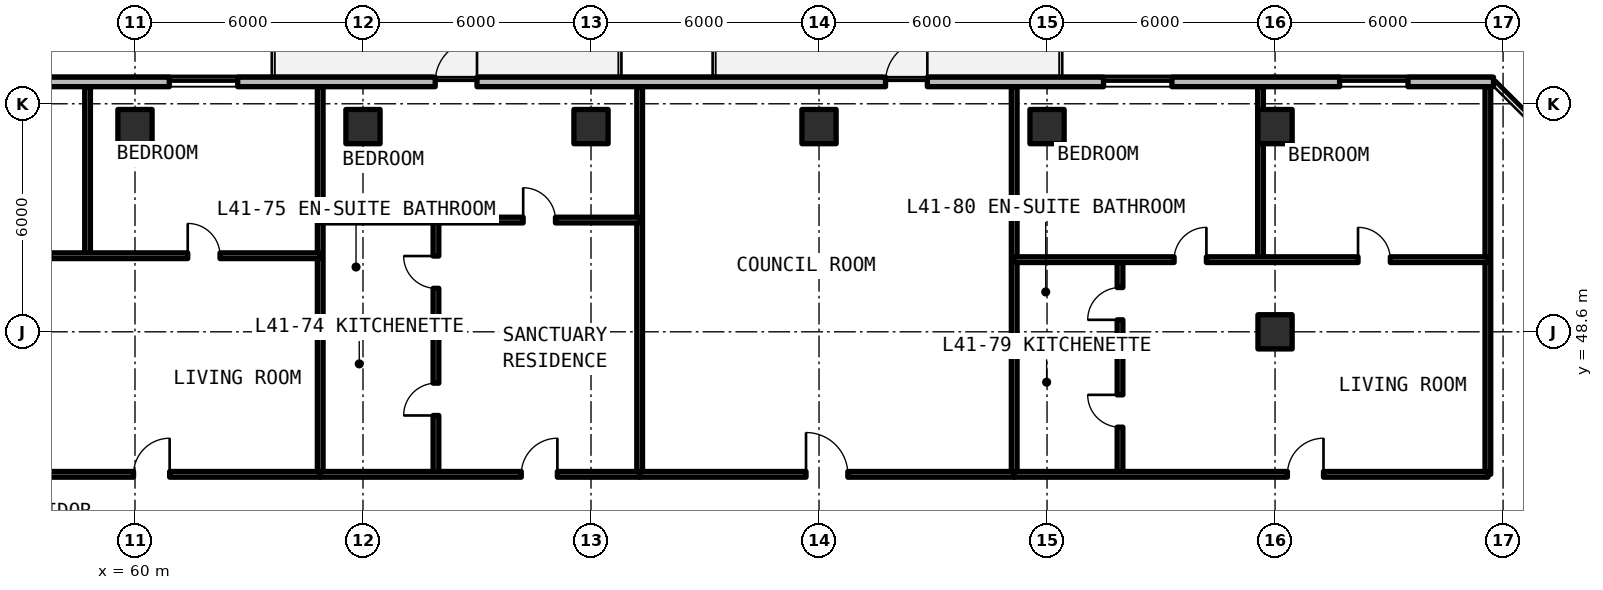
"""IFC4 building model, lengths in metres.
Left out: names, types, materials, properties, quantities, classifications, styles, units other than length and angle.
Written with IfcOpenShell. Run it as: python <this file> out.ifc"""

import sys

from ifc_helpers import new_model, si_unit, direction, frame, frame_2d, origin, origin_2d, place, context, subcontext, project, spatial, rectangle, extrude, element, fill, save


model = new_model("IFC4")
c1 = context("Model", 3, precision=1e-05, world=origin(), true_north=direction((0.0, 1.0)))
c2 = subcontext(c1, "Body", "Model", "MODEL_VIEW")
j1 = project(units=[si_unit("LENGTHUNIT", "METRE"), si_unit("PLANEANGLEUNIT", "RADIAN")], contexts=[c1])
p1 = place(None, origin())
s1 = spatial("IfcSite", under=j1, at=p1, CompositionType="ELEMENT")
p2 = place(p1, origin())
s2 = spatial("IfcBuilding", under=s1, at=p2, CompositionType="ELEMENT")
p3 = place(p2, frame((0.0, 0.0, 148.5)))
s3 = spatial("IfcBuildingStorey", under=s2, at=p3, CompositionType="ELEMENT", Elevation=148.5)
for number, where, z_axis, x_axis in (
    (1, (90.0, 48.6, 0.0), (0.0, 0.0, 1.0), (1.0, 0.0, 0.0)),
    (2, (60.0, 54.0, 0.0), (0.0, 0.0, 1.0), (1.0, 0.0, 0.0)),
    (3, (66.0, 54.0, 0.0), (0.0, 0.0, 1.0), (1.0, 0.0, 0.0)),
    (4, (72.0, 54.0, 0.0), (0.0, 0.0, 1.0), (1.0, 0.0, 0.0)),
    (5, (78.0, 54.0, 0.0), (0.0, 0.0, 1.0), (1.0, 0.0, 0.0)),
    (6, (84.0, 54.0, 0.0), (0.0, 0.0, 1.0), (1.0, 0.0, 0.0)),
    (7, (90.0, 54.0, 0.0), (0.0, 0.0, 1.0), (1.0, 0.0, 0.0)),
):
    element("IfcColumn", number, at=place(p3, frame(where, z_axis=z_axis, x_axis=x_axis)), inside=s3, PredefinedType="COLUMN", context=c2, shape_type="SweptSolid", body=[
        extrude(rectangle(XDim=0.9, YDim=0.9, at=origin_2d()), origin(), (0.0, 0.0, 1.0), 3.3),
    ])
p4 = place(p3, frame((95.748, 55.175, 0.0), z_axis=(0.0, 0.0, 1.0), x_axis=(-1.0, 0.0, 0.0)))
e8 = element("IfcWall", 8, at=p4, inside=s3, PredefinedType="SOLIDWALL", context=c2, shape_type="SweptSolid", body=[
    extrude(rectangle(XDim=43.623, YDim=0.25, at=frame_2d((21.812, 0.0))), origin(), (0.0, 0.0, 1.0), 3.08),
])
p5 = place(p4, frame((26.748, 0.0, 0.0)))
e9 = element("IfcOpeningElement", 9, at=p5, cuts=e8, PredefinedType="OPENING", context=c2, shape_type="SweptSolid", body=[
    extrude(rectangle(XDim=1.1, YDim=2.15, at=frame_2d((0.55, 1.075))), frame((0.0, 0.135, 0.0), z_axis=(0.0, -1.0, 0.0), x_axis=(1.0, 0.0, 0.0)), (0.0, 0.0, 1.0), 0.27),
])
p6 = place(p4, frame((14.898, 0.0, 0.0)))
e10 = element("IfcOpeningElement", 10, at=p6, cuts=e8, PredefinedType="OPENING", context=c2, shape_type="SweptSolid", body=[
    extrude(rectangle(XDim=1.1, YDim=2.15, at=frame_2d((0.55, 1.075))), frame((0.0, 0.135, 0.0), z_axis=(0.0, -1.0, 0.0), x_axis=(1.0, 0.0, 0.0)), (0.0, 0.0, 1.0), 0.27),
])
p7 = place(p4, frame((39.082, 0.0, 0.78)))
e11 = element("IfcOpeningElement", 11, at=p7, cuts=e8, PredefinedType="OPENING", context=c2, shape_type="SweptSolid", body=[
    extrude(rectangle(XDim=1.8, YDim=1.66, at=frame_2d((0.9, 0.83))), frame((0.0, 0.135, 0.0), z_axis=(0.0, -1.0, 0.0), x_axis=(1.0, 0.0, 0.0)), (0.0, 0.0, 1.0), 0.27),
])
p8 = place(p4, frame((33.045, 0.0, 0.78)))
e12 = element("IfcOpeningElement", 12, at=p8, cuts=e8, PredefinedType="OPENING", context=c2, shape_type="SweptSolid", body=[
    extrude(rectangle(XDim=1.8, YDim=1.66, at=frame_2d((0.9, 0.83))), frame((0.0, 0.135, 0.0), z_axis=(0.0, -1.0, 0.0), x_axis=(1.0, 0.0, 0.0)), (0.0, 0.0, 1.0), 0.27),
])
p9 = place(p4, frame((8.462, 0.0, 0.78)))
e13 = element("IfcOpeningElement", 13, at=p9, cuts=e8, PredefinedType="OPENING", context=c2, shape_type="SweptSolid", body=[
    extrude(rectangle(XDim=1.8, YDim=1.66, at=frame_2d((0.9, 0.83))), frame((0.0, 0.135, 0.0), z_axis=(0.0, -1.0, 0.0), x_axis=(1.0, 0.0, 0.0)), (0.0, 0.0, 1.0), 0.27),
])
p10 = place(p4, frame((2.25, 0.0, 0.78)))
e14 = element("IfcOpeningElement", 14, at=p10, cuts=e8, PredefinedType="OPENING", context=c2, shape_type="SweptSolid", body=[
    extrude(rectangle(XDim=1.8, YDim=1.66, at=frame_2d((0.9, 0.83))), frame((0.0, 0.135, 0.0), z_axis=(0.0, -1.0, 0.0), x_axis=(1.0, 0.0, 0.0)), (0.0, 0.0, 1.0), 0.27),
])
for number, where, z_axis, x_axis in (
    (15, (95.6, 44.85, 0.0), (0.0, 0.0, 1.0), (0.0, 1.0, 0.0)),
    (16, (64.874, 44.85, 0.0), (0.0, 0.0, 1.0), (0.0, 1.0, 0.0)),
):
    element("IfcWall", number, at=place(p3, frame(where, z_axis=z_axis, x_axis=x_axis)), inside=s3, PredefinedType="SOLIDWALL", context=c2, shape_type="SweptSolid", body=[
        extrude(rectangle(XDim=10.2, YDim=0.15, at=frame_2d((5.1, 0.0))), origin(), (0.0, 0.0, 1.0), 2.35),
    ])
p11 = place(p3, frame((58.752, 50.602, 0.0), z_axis=(0.0, 0.0, 1.0), x_axis=(0.0, 1.0, 0.0)))
e17 = element("IfcWall", 17, at=p11, inside=s3, PredefinedType="PARTITIONING", context=c2, shape_type="SweptSolid", body=[
    extrude(rectangle(XDim=4.448, YDim=0.15, at=frame_2d((2.224, 0.0))), origin(), (0.0, 0.0, 1.0), 2.35),
])
p12 = place(p3, frame((52.12, 50.602, 0.0), z_axis=(0.0, 0.0, 1.0), x_axis=(1.0, 0.0, 0.0)))
e18 = element("IfcWall", 18, at=p12, inside=s3, PredefinedType="PARTITIONING", context=c2, shape_type="SweptSolid", body=[
    extrude(rectangle(XDim=12.754, YDim=0.15, at=frame_2d((6.377, 0.0))), origin(), (0.0, 0.0, 1.0), 2.35),
])
p13 = place(p12, frame((4.791, 0.0, 0.0)))
e19 = element("IfcOpeningElement", 19, at=p13, cuts=e18, PredefinedType="OPENING", context=c2, shape_type="SweptSolid", body=[
    extrude(rectangle(XDim=0.85, YDim=2.1, at=frame_2d((0.425, 1.05))), frame((0.0, 0.085, 0.0), z_axis=(0.0, -1.0, 0.0), x_axis=(1.0, 0.0, 0.0)), (0.0, 0.0, 1.0), 0.17),
])
p14 = place(p12, frame((9.268, 0.0, 0.0)))
e20 = element("IfcOpeningElement", 20, at=p14, cuts=e18, PredefinedType="OPENING", context=c2, shape_type="SweptSolid", body=[
    extrude(rectangle(XDim=0.85, YDim=2.1, at=frame_2d((0.425, 1.05))), frame((0.0, 0.085, 0.0), z_axis=(0.0, -1.0, 0.0), x_axis=(1.0, 0.0, 0.0)), (0.0, 0.0, 1.0), 0.17),
])
p15 = place(p3, frame((52.12, 44.85, 0.0), z_axis=(0.0, 0.0, 1.0), x_axis=(1.0, 0.0, 0.0)))
e21 = element("IfcWall", 21, at=p15, inside=s3, PredefinedType="SOLIDWALL", context=c2, shape_type="SweptSolid", body=[
    extrude(rectangle(XDim=12.754, YDim=0.15, at=frame_2d((6.377, 0.0))), origin(), (0.0, 0.0, 1.0), 2.35),
])
p16 = place(p15, frame((7.842, 0.0, 0.0)))
e22 = element("IfcOpeningElement", 22, at=p16, cuts=e21, PredefinedType="OPENING", context=c2, shape_type="SweptSolid", body=[
    extrude(rectangle(XDim=0.95, YDim=2.15, at=frame_2d((0.475, 1.075))), frame((0.0, 0.085, 0.0), z_axis=(0.0, -1.0, 0.0), x_axis=(1.0, 0.0, 0.0)), (0.0, 0.0, 1.0), 0.17),
])
p17 = place(p3, frame((73.28, 44.85, 0.0), z_axis=(0.0, 0.0, 1.0), x_axis=(0.0, 1.0, 0.0)))
e23 = element("IfcWall", 23, at=p17, inside=s3, PredefinedType="SOLIDWALL", context=c2, shape_type="SweptSolid", body=[
    extrude(rectangle(XDim=10.2, YDim=0.15, at=frame_2d((5.1, 0.0))), origin(), (0.0, 0.0, 1.0), 2.35),
])
p18 = place(p3, frame((64.874, 48.798, 0.0), z_axis=(0.0, 0.0, 1.0), x_axis=(1.0, 0.0, 0.0)))
e24 = element("IfcWall", 24, at=p18, inside=s3, PredefinedType="PARTITIONING", context=c2, shape_type="SweptSolid", body=[
    extrude(rectangle(XDim=3.046, YDim=0.15, at=frame_2d((1.523, 0.0))), origin(), (0.0, 0.0, 1.0), 2.35),
])
p19 = place(p3, frame((67.92, 44.85, 0.0), z_axis=(0.0, 0.0, 1.0), x_axis=(0.0, 1.0, 0.0)))
e25 = element("IfcWall", 25, at=p19, inside=s3, PredefinedType="PARTITIONING", context=c2, shape_type="SweptSolid", body=[
    extrude(rectangle(XDim=6.69, YDim=0.15, at=frame_2d((3.345, 0.0))), origin(), (0.0, 0.0, 1.0), 2.35),
])
p20 = place(p19, frame((1.549, 0.0, 0.0)))
e26 = element("IfcOpeningElement", 26, at=p20, cuts=e25, PredefinedType="OPENING", context=c2, shape_type="SweptSolid", body=[
    extrude(rectangle(XDim=0.85, YDim=2.1, at=frame_2d((0.425, 1.05))), frame((0.0, 0.085, 0.0), z_axis=(0.0, -1.0, 0.0), x_axis=(1.0, 0.0, 0.0)), (0.0, 0.0, 1.0), 0.17),
])
p21 = place(p19, frame((4.894, 0.0, 0.0)))
e27 = element("IfcOpeningElement", 27, at=p21, cuts=e25, PredefinedType="OPENING", context=c2, shape_type="SweptSolid", body=[
    extrude(rectangle(XDim=0.85, YDim=2.1, at=frame_2d((0.425, 1.05))), frame((0.0, 0.085, 0.0), z_axis=(0.0, -1.0, 0.0), x_axis=(1.0, 0.0, 0.0)), (0.0, 0.0, 1.0), 0.17),
])
p22 = place(p3, frame((64.874, 51.541, 0.0), z_axis=(0.0, 0.0, 1.0), x_axis=(1.0, 0.0, 0.0)))
e28 = element("IfcWall", 28, at=p22, inside=s3, PredefinedType="PARTITIONING", context=c2, shape_type="SweptSolid", body=[
    extrude(rectangle(XDim=8.406, YDim=0.15, at=frame_2d((4.203, 0.0))), origin(), (0.0, 0.0, 1.0), 2.35),
])
p23 = place(p22, frame((5.341, 0.0, 0.0)))
e29 = element("IfcOpeningElement", 29, at=p23, cuts=e28, PredefinedType="OPENING", context=c2, shape_type="SweptSolid", body=[
    extrude(rectangle(XDim=0.85, YDim=2.1, at=frame_2d((0.425, 1.05))), frame((0.0, 0.085, 0.0), z_axis=(0.0, -1.0, 0.0), x_axis=(1.0, 0.0, 0.0)), (0.0, 0.0, 1.0), 0.17),
])
p24 = place(p3, frame((64.874, 44.85, 0.0), z_axis=(0.0, 0.0, 1.0), x_axis=(1.0, 0.0, 0.0)))
e30 = element("IfcWall", 30, at=p24, inside=s3, PredefinedType="SOLIDWALL", context=c2, shape_type="SweptSolid", body=[
    extrude(rectangle(XDim=8.406, YDim=0.15, at=frame_2d((4.203, 0.0))), origin(), (0.0, 0.0, 1.0), 2.35),
])
p25 = place(p24, frame((5.291, 0.0, 0.0)))
e31 = element("IfcOpeningElement", 31, at=p25, cuts=e30, PredefinedType="OPENING", context=c2, shape_type="SweptSolid", body=[
    extrude(rectangle(XDim=0.95, YDim=2.15, at=frame_2d((0.475, 1.075))), frame((0.0, 0.085, 0.0), z_axis=(0.0, -1.0, 0.0), x_axis=(1.0, 0.0, 0.0)), (0.0, 0.0, 1.0), 0.17),
])
p26 = place(p3, frame((83.136, 44.85, 0.0), z_axis=(0.0, 0.0, 1.0), x_axis=(0.0, 1.0, 0.0)))
e32 = element("IfcWall", 32, at=p26, inside=s3, PredefinedType="SOLIDWALL", context=c2, shape_type="SweptSolid", body=[
    extrude(rectangle(XDim=10.2, YDim=0.15, at=frame_2d((5.1, 0.0))), origin(), (0.0, 0.0, 1.0), 2.35),
])
p27 = place(p3, frame((73.28, 44.85, 0.0), z_axis=(0.0, 0.0, 1.0), x_axis=(1.0, 0.0, 0.0)))
e33 = element("IfcWall", 33, at=p27, inside=s3, PredefinedType="SOLIDWALL", context=c2, shape_type="SweptSolid", body=[
    extrude(rectangle(XDim=9.855, YDim=0.15, at=frame_2d((4.928, 0.0))), origin(), (0.0, 0.0, 1.0), 2.35),
])
p28 = place(p27, frame((4.378, 0.0, 0.0)))
e34 = element("IfcOpeningElement", 34, at=p28, cuts=e33, PredefinedType="OPENING", context=c2, shape_type="SweptSolid", body=[
    extrude(rectangle(XDim=1.1, YDim=2.15, at=frame_2d((0.55, 1.075))), frame((0.0, 0.085, 0.0), z_axis=(0.0, -1.0, 0.0), x_axis=(1.0, 0.0, 0.0)), (0.0, 0.0, 1.0), 0.17),
])
p29 = place(p3, frame((83.136, 48.183, 0.0), z_axis=(0.0, 0.0, 1.0), x_axis=(1.0, 0.0, 0.0)))
e35 = element("IfcWall", 35, at=p29, inside=s3, PredefinedType="PARTITIONING", context=c2, shape_type="SweptSolid", body=[
    extrude(rectangle(XDim=2.784, YDim=0.15, at=frame_2d((1.392, 0.0))), origin(), (0.0, 0.0, 1.0), 2.35),
])
p30 = place(p3, frame((85.92, 44.85, 0.0), z_axis=(0.0, 0.0, 1.0), x_axis=(0.0, 1.0, 0.0)))
e36 = element("IfcWall", 36, at=p30, inside=s3, PredefinedType="PARTITIONING", context=c2, shape_type="SweptSolid", body=[
    extrude(rectangle(XDim=5.648, YDim=0.15, at=frame_2d((2.824, 0.0))), origin(), (0.0, 0.0, 1.0), 2.35),
])
p31 = place(p30, frame((1.241, 0.0, 0.0)))
e37 = element("IfcOpeningElement", 37, at=p31, cuts=e36, PredefinedType="OPENING", context=c2, shape_type="SweptSolid", body=[
    extrude(rectangle(XDim=0.85, YDim=2.1, at=frame_2d((0.425, 1.05))), frame((0.0, 0.085, 0.0), z_axis=(0.0, -1.0, 0.0), x_axis=(1.0, 0.0, 0.0)), (0.0, 0.0, 1.0), 0.17),
])
p32 = place(p30, frame((4.065, 0.0, 0.0)))
e38 = element("IfcOpeningElement", 38, at=p32, cuts=e36, PredefinedType="OPENING", context=c2, shape_type="SweptSolid", body=[
    extrude(rectangle(XDim=0.85, YDim=2.1, at=frame_2d((0.425, 1.05))), frame((0.0, 0.085, 0.0), z_axis=(0.0, -1.0, 0.0), x_axis=(1.0, 0.0, 0.0)), (0.0, 0.0, 1.0), 0.17),
])
p33 = place(p3, frame((89.617, 50.499, 0.0), z_axis=(0.0, 0.0, 1.0), x_axis=(0.0, 1.0, 0.0)))
e39 = element("IfcWall", 39, at=p33, inside=s3, PredefinedType="PARTITIONING", context=c2, shape_type="SweptSolid", body=[
    extrude(rectangle(XDim=4.552, YDim=0.15, at=frame_2d((2.276, 0.0))), origin(), (0.0, 0.0, 1.0), 2.35),
])
p34 = place(p3, frame((83.136, 50.499, 0.0), z_axis=(0.0, 0.0, 1.0), x_axis=(1.0, 0.0, 0.0)))
e40 = element("IfcWall", 40, at=p34, inside=s3, PredefinedType="PARTITIONING", context=c2, shape_type="SweptSolid", body=[
    extrude(rectangle(XDim=12.464, YDim=0.15, at=frame_2d((6.232, 0.0))), origin(), (0.0, 0.0, 1.0), 2.35),
])
p35 = place(p34, frame((4.208, 0.0, 0.0)))
e41 = element("IfcOpeningElement", 41, at=p35, cuts=e40, PredefinedType="OPENING", context=c2, shape_type="SweptSolid", body=[
    extrude(rectangle(XDim=0.85, YDim=2.1, at=frame_2d((0.425, 1.05))), frame((0.0, 0.085, 0.0), z_axis=(0.0, -1.0, 0.0), x_axis=(1.0, 0.0, 0.0)), (0.0, 0.0, 1.0), 0.17),
])
p36 = place(p34, frame((9.048, 0.0, 0.0)))
e42 = element("IfcOpeningElement", 42, at=p36, cuts=e40, PredefinedType="OPENING", context=c2, shape_type="SweptSolid", body=[
    extrude(rectangle(XDim=0.85, YDim=2.1, at=frame_2d((0.425, 1.05))), frame((0.0, 0.085, 0.0), z_axis=(0.0, -1.0, 0.0), x_axis=(1.0, 0.0, 0.0)), (0.0, 0.0, 1.0), 0.17),
])
p37 = place(p3, frame((83.136, 44.85, 0.0), z_axis=(0.0, 0.0, 1.0), x_axis=(1.0, 0.0, 0.0)))
e43 = element("IfcWall", 43, at=p37, inside=s3, PredefinedType="SOLIDWALL", context=c2, shape_type="SweptSolid", body=[
    extrude(rectangle(XDim=12.464, YDim=0.15, at=frame_2d((6.232, 0.0))), origin(), (0.0, 0.0, 1.0), 2.35),
])
p38 = place(p37, frame((7.189, 0.0, 0.0)))
e44 = element("IfcOpeningElement", 44, at=p38, cuts=e43, PredefinedType="OPENING", context=c2, shape_type="SweptSolid", body=[
    extrude(rectangle(XDim=0.95, YDim=2.15, at=frame_2d((0.475, 1.075))), frame((0.0, 0.085, 0.0), z_axis=(0.0, -1.0, 0.0), x_axis=(1.0, 0.0, 0.0)), (0.0, 0.0, 1.0), 0.17),
])
p39 = place(p5, frame((1.1, 0.0, 0.0), z_axis=(0.0, 0.0, 1.0), x_axis=(-1.0, 0.0, 0.0)))
e45 = element("IfcDoor", 45, at=p39, inside=s3, OperationType="SINGLE_SWING_LEFT", PredefinedType="DOOR", context=c2, shape_type="SweptSolid", body=[
    extrude(rectangle(XDim=1.1, YDim=2.15, at=frame_2d((0.55, 1.075))), frame((0.0, 0.025, 0.0), z_axis=(0.0, -1.0, 0.0), x_axis=(1.0, 0.0, 0.0)), (0.0, 0.0, 1.0), 0.05),
])
fill(e9, e45)
p40 = place(p6, frame((1.1, 0.0, 0.0), z_axis=(0.0, 0.0, 1.0), x_axis=(-1.0, 0.0, 0.0)))
e46 = element("IfcDoor", 46, at=p40, inside=s3, OperationType="SINGLE_SWING_RIGHT", PredefinedType="DOOR", context=c2, shape_type="SweptSolid", body=[
    extrude(rectangle(XDim=1.1, YDim=2.15, at=frame_2d((0.55, 1.075))), frame((0.0, 0.025, 0.0), z_axis=(0.0, -1.0, 0.0), x_axis=(1.0, 0.0, 0.0)), (0.0, 0.0, 1.0), 0.05),
])
fill(e10, e46)
p41 = place(p8, origin())
e47 = element("IfcWindow", 47, at=p41, inside=s3, PartitioningType="SINGLE_PANEL", PredefinedType="WINDOW", context=c2, shape_type="SweptSolid", body=[
    extrude(rectangle(XDim=1.8, YDim=1.66, at=frame_2d((0.9, 0.83))), frame((0.0, 0.03, 0.0), z_axis=(0.0, -1.0, 0.0), x_axis=(1.0, 0.0, 0.0)), (0.0, 0.0, 1.0), 0.06),
])
fill(e12, e47)
p42 = place(p9, origin())
e48 = element("IfcWindow", 48, at=p42, inside=s3, PartitioningType="SINGLE_PANEL", PredefinedType="WINDOW", context=c2, shape_type="SweptSolid", body=[
    extrude(rectangle(XDim=1.8, YDim=1.66, at=frame_2d((0.9, 0.83))), frame((0.0, 0.03, 0.0), z_axis=(0.0, -1.0, 0.0), x_axis=(1.0, 0.0, 0.0)), (0.0, 0.0, 1.0), 0.06),
])
fill(e13, e48)
p43 = place(p10, origin())
e49 = element("IfcWindow", 49, at=p43, inside=s3, PartitioningType="SINGLE_PANEL", PredefinedType="WINDOW", context=c2, shape_type="SweptSolid", body=[
    extrude(rectangle(XDim=1.8, YDim=1.66, at=frame_2d((0.9, 0.83))), frame((0.0, 0.03, 0.0), z_axis=(0.0, -1.0, 0.0), x_axis=(1.0, 0.0, 0.0)), (0.0, 0.0, 1.0), 0.06),
])
fill(e14, e49)
p44 = place(p14, origin())
e50 = element("IfcDoor", 50, at=p44, inside=s3, OperationType="SINGLE_SWING_LEFT", PredefinedType="DOOR", context=c2, shape_type="SweptSolid", body=[
    extrude(rectangle(XDim=0.85, YDim=2.1, at=frame_2d((0.425, 1.05))), frame((0.0, 0.025, 0.0), z_axis=(0.0, -1.0, 0.0), x_axis=(1.0, 0.0, 0.0)), (0.0, 0.0, 1.0), 0.05),
])
fill(e20, e50)
p45 = place(p16, origin())
e51 = element("IfcDoor", 51, at=p45, inside=s3, OperationType="SINGLE_SWING_RIGHT", PredefinedType="DOOR", context=c2, shape_type="SweptSolid", body=[
    extrude(rectangle(XDim=0.95, YDim=2.15, at=frame_2d((0.475, 1.075))), frame((0.0, 0.025, 0.0), z_axis=(0.0, -1.0, 0.0), x_axis=(1.0, 0.0, 0.0)), (0.0, 0.0, 1.0), 0.05),
])
fill(e22, e51)
p46 = place(p20, origin())
e52 = element("IfcDoor", 52, at=p46, inside=s3, OperationType="SINGLE_SWING_LEFT", PredefinedType="DOOR", context=c2, shape_type="SweptSolid", body=[
    extrude(rectangle(XDim=0.85, YDim=2.1, at=frame_2d((0.425, 1.05))), frame((0.0, 0.025, 0.0), z_axis=(0.0, -1.0, 0.0), x_axis=(1.0, 0.0, 0.0)), (0.0, 0.0, 1.0), 0.05),
])
fill(e26, e52)
p47 = place(p21, origin())
e53 = element("IfcDoor", 53, at=p47, inside=s3, OperationType="SINGLE_SWING_RIGHT", PredefinedType="DOOR", context=c2, shape_type="SweptSolid", body=[
    extrude(rectangle(XDim=0.85, YDim=2.1, at=frame_2d((0.425, 1.05))), frame((0.0, 0.025, 0.0), z_axis=(0.0, -1.0, 0.0), x_axis=(1.0, 0.0, 0.0)), (0.0, 0.0, 1.0), 0.05),
])
fill(e27, e53)
p48 = place(p23, origin())
e54 = element("IfcDoor", 54, at=p48, inside=s3, OperationType="SINGLE_SWING_LEFT", PredefinedType="DOOR", context=c2, shape_type="SweptSolid", body=[
    extrude(rectangle(XDim=0.85, YDim=2.1, at=frame_2d((0.425, 1.05))), frame((0.0, 0.025, 0.0), z_axis=(0.0, -1.0, 0.0), x_axis=(1.0, 0.0, 0.0)), (0.0, 0.0, 1.0), 0.05),
])
fill(e29, e54)
p49 = place(p25, origin())
e55 = element("IfcDoor", 55, at=p49, inside=s3, OperationType="SINGLE_SWING_RIGHT", PredefinedType="DOOR", context=c2, shape_type="SweptSolid", body=[
    extrude(rectangle(XDim=0.95, YDim=2.15, at=frame_2d((0.475, 1.075))), frame((0.0, 0.025, 0.0), z_axis=(0.0, -1.0, 0.0), x_axis=(1.0, 0.0, 0.0)), (0.0, 0.0, 1.0), 0.05),
])
fill(e31, e55)
p50 = place(p28, origin())
e56 = element("IfcDoor", 56, at=p50, inside=s3, OperationType="SINGLE_SWING_LEFT", PredefinedType="DOOR", context=c2, shape_type="SweptSolid", body=[
    extrude(rectangle(XDim=1.1, YDim=2.15, at=frame_2d((0.55, 1.075))), frame((0.0, 0.025, 0.0), z_axis=(0.0, -1.0, 0.0), x_axis=(1.0, 0.0, 0.0)), (0.0, 0.0, 1.0), 0.05),
])
fill(e34, e56)
p51 = place(p31, origin())
e57 = element("IfcDoor", 57, at=p51, inside=s3, OperationType="SINGLE_SWING_RIGHT", PredefinedType="DOOR", context=c2, shape_type="SweptSolid", body=[
    extrude(rectangle(XDim=0.85, YDim=2.1, at=frame_2d((0.425, 1.05))), frame((0.0, 0.025, 0.0), z_axis=(0.0, -1.0, 0.0), x_axis=(1.0, 0.0, 0.0)), (0.0, 0.0, 1.0), 0.05),
])
fill(e37, e57)
p52 = place(p32, origin())
e58 = element("IfcDoor", 58, at=p52, inside=s3, OperationType="SINGLE_SWING_LEFT", PredefinedType="DOOR", context=c2, shape_type="SweptSolid", body=[
    extrude(rectangle(XDim=0.85, YDim=2.1, at=frame_2d((0.425, 1.05))), frame((0.0, 0.025, 0.0), z_axis=(0.0, -1.0, 0.0), x_axis=(1.0, 0.0, 0.0)), (0.0, 0.0, 1.0), 0.05),
])
fill(e38, e58)
p53 = place(p35, origin())
e59 = element("IfcDoor", 59, at=p53, inside=s3, OperationType="SINGLE_SWING_RIGHT", PredefinedType="DOOR", context=c2, shape_type="SweptSolid", body=[
    extrude(rectangle(XDim=0.85, YDim=2.1, at=frame_2d((0.425, 1.05))), frame((0.0, 0.025, 0.0), z_axis=(0.0, -1.0, 0.0), x_axis=(1.0, 0.0, 0.0)), (0.0, 0.0, 1.0), 0.05),
])
fill(e41, e59)
p54 = place(p36, origin())
e60 = element("IfcDoor", 60, at=p54, inside=s3, OperationType="SINGLE_SWING_LEFT", PredefinedType="DOOR", context=c2, shape_type="SweptSolid", body=[
    extrude(rectangle(XDim=0.85, YDim=2.1, at=frame_2d((0.425, 1.05))), frame((0.0, 0.025, 0.0), z_axis=(0.0, -1.0, 0.0), x_axis=(1.0, 0.0, 0.0)), (0.0, 0.0, 1.0), 0.05),
])
fill(e42, e60)
p55 = place(p38, origin())
e61 = element("IfcDoor", 61, at=p55, inside=s3, OperationType="SINGLE_SWING_RIGHT", PredefinedType="DOOR", context=c2, shape_type="SweptSolid", body=[
    extrude(rectangle(XDim=0.95, YDim=2.15, at=frame_2d((0.475, 1.075))), frame((0.0, 0.025, 0.0), z_axis=(0.0, -1.0, 0.0), x_axis=(1.0, 0.0, 0.0)), (0.0, 0.0, 1.0), 0.05),
])
fill(e44, e61)
save(model, sys.argv[1])
